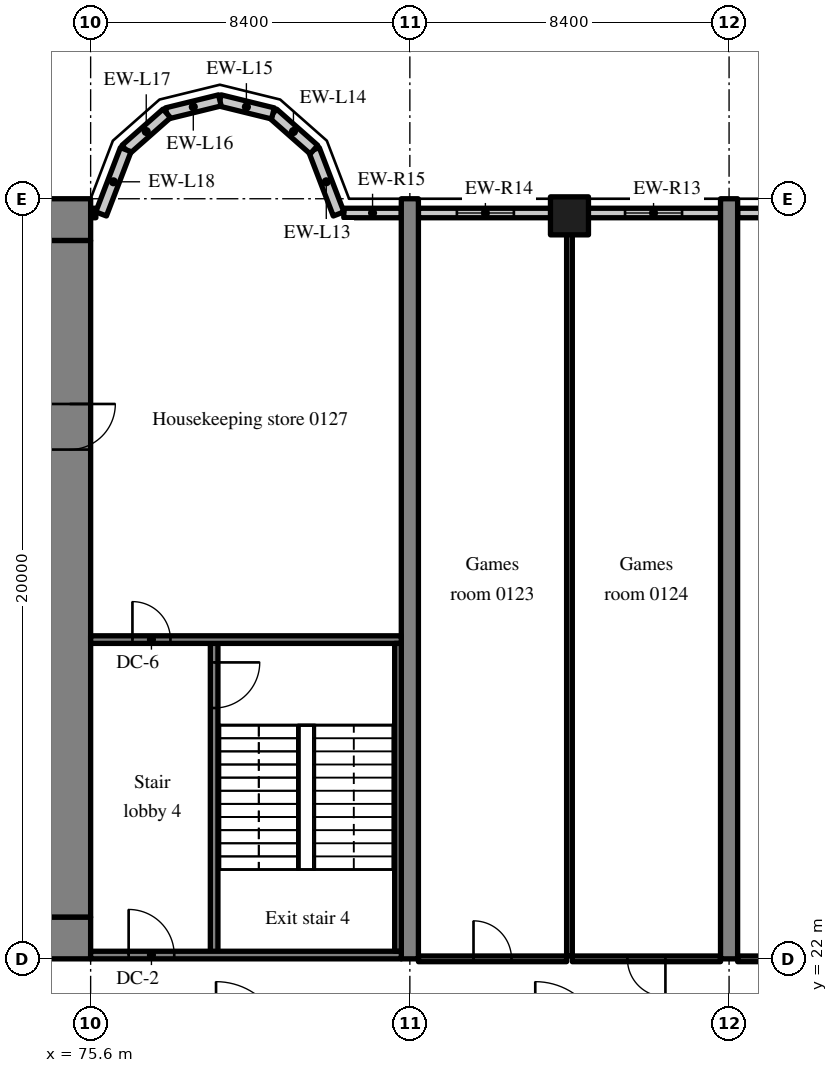
"""IFC4 building model, lengths in metres.
Left out: names, types, materials, properties, quantities, classifications, styles, units other than length and angle.
Written with IfcOpenShell. Run it as: python <this file> out.ifc"""

import sys

from ifc_helpers import new_model, si_unit, direction, frame, frame_2d, origin, origin_2d, place, context, subcontext, project, spatial, rectangle, extrude, source, transform, mapped, element, fill, save


model = new_model("IFC4")
c1 = context("Model", 3, precision=1e-05, world=origin(), true_north=direction((0.0, 1.0)))
c2 = subcontext(c1, "Body", "Model", "MODEL_VIEW")
j1 = project(units=[si_unit("LENGTHUNIT", "METRE"), si_unit("PLANEANGLEUNIT", "RADIAN")], contexts=[c1])
p1 = place(None, origin())
s1 = spatial("IfcSite", under=j1, at=p1, CompositionType="ELEMENT")
p2 = place(p1, origin())
s2 = spatial("IfcBuilding", under=s1, at=p2, CompositionType="ELEMENT")
p3 = place(p2, frame((0.0, 0.0, 6.0)))
s3 = spatial("IfcBuildingStorey", under=s2, at=p3, CompositionType="ELEMENT", Elevation=6.0)
m1 = source(origin(), c2, "Body", "SweptSolid", [
    extrude(rectangle(XDim=50.4, YDim=1.1, at=frame_2d((25.2, 0.0))), origin(), (0.0, 0.0, 1.0), 5.12),
])
p4 = place(p3, frame((25.2, 22.55, 0.0), z_axis=(0.0, 0.0, 1.0), x_axis=(1.0, 0.0, 0.0)))
e1 = element("IfcWall", 1, at=p4, inside=s3, PredefinedType="SHEAR", context=c2, shape_type="MappedRepresentation", body=[
    mapped(m1, transform((0.0, 0.0, 0.0), scale=1.0)),
])
m2 = source(origin(), c2, "Body", "SweptSolid", [
    extrude(rectangle(XDim=1.8, YDim=2.1, at=frame_2d((0.9, 1.05))), frame((0.0, 0.56, 0.0), z_axis=(0.0, -1.0, 0.0), x_axis=(1.0, 0.0, 0.0)), (0.0, 0.0, 1.0), 1.12),
])
p5 = place(p4, frame((15.9, 0.0, 0.0)))
e2 = element("IfcOpeningElement", 2, at=p5, cuts=e1, PredefinedType="OPENING", context=c2, shape_type="MappedRepresentation", body=[
    mapped(m2, transform((0.0, 0.0, 0.0), scale=1.0)),
])
m3 = source(origin(), c2, "Body", "SweptSolid", [
    extrude(rectangle(XDim=1.2, YDim=2.1, at=frame_2d((0.6, 1.05))), frame((0.0, 0.56, 0.0), z_axis=(0.0, -1.0, 0.0), x_axis=(1.0, 0.0, 0.0)), (0.0, 0.0, 1.0), 1.12),
])
p6 = place(p4, frame((27.0, 0.0, 0.0)))
e3 = element("IfcOpeningElement", 3, at=p6, cuts=e1, PredefinedType="OPENING", context=c2, shape_type="MappedRepresentation", body=[
    mapped(m3, transform((0.0, 0.0, 0.0), scale=1.0)),
])
m4 = source(origin(), c2, "Body", "SweptSolid", [
    extrude(rectangle(XDim=0.9, YDim=2.1, at=frame_2d((0.45, 1.05))), frame((0.0, 0.56, 0.0), z_axis=(0.0, -1.0, 0.0), x_axis=(1.0, 0.0, 0.0)), (0.0, 0.0, 1.0), 1.12),
])
p7 = place(p4, frame((34.5, 0.0, 0.0)))
e4 = element("IfcOpeningElement", 4, at=p7, cuts=e1, PredefinedType="OPENING", context=c2, shape_type="MappedRepresentation", body=[
    mapped(m4, transform((0.0, 0.0, 0.0), scale=1.0)),
])
p8 = place(p4, frame((31.5, 0.0, 0.0)))
e5 = element("IfcOpeningElement", 5, at=p8, cuts=e1, PredefinedType="OPENING", context=c2, shape_type="MappedRepresentation", body=[
    mapped(m4, transform((0.0, 0.0, 0.0), scale=1.0)),
])
p9 = place(p4, frame((39.75, 0.0, 0.0)))
e6 = element("IfcOpeningElement", 6, at=p9, cuts=e1, PredefinedType="OPENING", context=c2, shape_type="MappedRepresentation", body=[
    mapped(m4, transform((0.0, 0.0, 0.0), scale=1.0)),
])
p10 = place(p4, frame((36.75, 0.0, 0.0)))
e7 = element("IfcOpeningElement", 7, at=p10, cuts=e1, PredefinedType="OPENING", context=c2, shape_type="MappedRepresentation", body=[
    mapped(m4, transform((0.0, 0.0, 0.0), scale=1.0)),
])
p11 = place(p4, frame((6.425, 0.0, 0.0)))
e8 = element("IfcOpeningElement", 8, at=p11, cuts=e1, PredefinedType="OPENING", context=c2, shape_type="MappedRepresentation", body=[
    mapped(m3, transform((0.0, 0.0, 0.0), scale=1.0)),
])
p12 = place(p4, frame((47.675, 0.0, 0.0)))
e9 = element("IfcOpeningElement", 9, at=p12, cuts=e1, PredefinedType="OPENING", context=c2, shape_type="MappedRepresentation", body=[
    mapped(m3, transform((0.0, 0.0, 0.0), scale=1.0)),
])
p13 = place(p3, frame((25.2, 41.45, 0.0), z_axis=(0.0, 0.0, 1.0), x_axis=(1.0, 0.0, 0.0)))
e10 = element("IfcWall", 10, at=p13, inside=s3, PredefinedType="SHEAR", context=c2, shape_type="MappedRepresentation", body=[
    mapped(m1, transform((0.0, 0.0, 0.0), scale=1.0)),
])
m5 = source(origin(), c2, "Body", "SweptSolid", [
    extrude(rectangle(XDim=17.8, YDim=1.1, at=frame_2d((8.9, 0.0))), origin(), (0.0, 0.0, 1.0), 5.12),
])
p14 = place(p3, frame((75.05, 23.1, 0.0), z_axis=(0.0, 0.0, 1.0), x_axis=(0.0, 1.0, 0.0)))
e11 = element("IfcWall", 11, at=p14, inside=s3, PredefinedType="SHEAR", context=c2, shape_type="MappedRepresentation", body=[
    mapped(m5, transform((0.0, 0.0, 0.0), scale=1.0)),
])
p15 = place(p14, frame((12.3, 0.0, 0.0)))
e12 = element("IfcOpeningElement", 12, at=p15, cuts=e11, PredefinedType="OPENING", context=c2, shape_type="MappedRepresentation", body=[
    mapped(m3, transform((0.0, 0.0, 0.0), scale=1.0)),
])
m6 = source(origin(), c2, "Body", "SweptSolid", [
    extrude(rectangle(XDim=20.0, YDim=0.45, at=frame_2d((10.0, 0.0))), origin(), (0.0, 0.0, 1.0), 5.12),
])
for number, where, z_axis, x_axis in (
    (13, (84.0, 22.0, 0.0), (0.0, 0.0, 1.0), (0.0, 1.0, 0.0)),
    (14, (92.4, 22.0, 0.0), (0.0, 0.0, 1.0), (0.0, 1.0, 0.0)),
):
    element("IfcWall", number, at=place(p3, frame(where, z_axis=z_axis, x_axis=x_axis)), inside=s3, PredefinedType="SHEAR", context=c2, shape_type="MappedRepresentation", body=[
        mapped(m6, transform((0.0, 0.0, 0.0), scale=1.0)),
    ])
m7 = source(origin(), c2, "Body", "SweptSolid", [
    extrude(rectangle(XDim=1.0, YDim=1.0, at=origin_2d()), origin(), (0.0, 0.0, 1.0), 5.12),
])
p16 = place(p3, frame((88.2, 41.55, 0.0), z_axis=(0.0, 0.0, 1.0), x_axis=(1.0, 0.0, 0.0)))
e15 = element("IfcColumn", 15, at=p16, inside=s3, PredefinedType="COLUMN", context=c2, shape_type="MappedRepresentation", body=[
    mapped(m7, transform((0.0, 0.0, 0.0), scale=1.0)),
])
m8 = source(origin(), c2, "Body", "SweptSolid", [
    extrude(rectangle(XDim=15.675, YDim=0.25, at=frame_2d((7.837, 0.0))), origin(), (0.0, 0.0, 1.0), 4.37),
])
p17 = place(p3, frame((108.3, 41.625, 0.0), z_axis=(0.0, 0.0, 1.0), x_axis=(-1.0, 0.0, 0.0)))
e16 = element("IfcWall", 16, at=p17, inside=s3, PredefinedType="SOLIDWALL", context=c2, shape_type="MappedRepresentation", body=[
    mapped(m8, transform((0.0, 0.0, 0.0), scale=1.0)),
])
m9 = source(origin(), c2, "Body", "SweptSolid", [
    extrude(rectangle(XDim=1.5, YDim=1.5, at=frame_2d((0.75, 0.75))), frame((0.0, 0.135, 0.0), z_axis=(0.0, -1.0, 0.0), x_axis=(1.0, 0.0, 0.0)), (0.0, 0.0, 1.0), 0.27),
])
p18 = place(p17, frame((1.209, 0.0, 0.9)))
e17 = element("IfcOpeningElement", 17, at=p18, cuts=e16, PredefinedType="OPENING", context=c2, shape_type="MappedRepresentation", body=[
    mapped(m9, transform((0.0, 0.0, 0.0), scale=1.0)),
])
p19 = place(p17, frame((5.128, 0.0, 0.9)))
e18 = element("IfcOpeningElement", 18, at=p19, cuts=e16, PredefinedType="OPENING", context=c2, shape_type="MappedRepresentation", body=[
    mapped(m9, transform((0.0, 0.0, 0.0), scale=1.0)),
])
p20 = place(p17, frame((9.047, 0.0, 0.9)))
e19 = element("IfcOpeningElement", 19, at=p20, cuts=e16, PredefinedType="OPENING", context=c2, shape_type="MappedRepresentation", body=[
    mapped(m9, transform((0.0, 0.0, 0.0), scale=1.0)),
])
p21 = place(p17, frame((12.966, 0.0, 0.9)))
e20 = element("IfcOpeningElement", 20, at=p21, cuts=e16, PredefinedType="OPENING", context=c2, shape_type="MappedRepresentation", body=[
    mapped(m9, transform((0.0, 0.0, 0.0), scale=1.0)),
])
m10 = source(origin(), c2, "Body", "SweptSolid", [
    extrude(rectangle(XDim=3.525, YDim=0.25, at=frame_2d((1.763, 0.0))), origin(), (0.0, 0.0, 1.0), 4.37),
])
p22 = place(p3, frame((92.175, 41.625, 0.0), z_axis=(0.0, 0.0, 1.0), x_axis=(-1.0, 0.0, 0.0)))
e21 = element("IfcWall", 21, at=p22, inside=s3, PredefinedType="SOLIDWALL", context=c2, shape_type="MappedRepresentation", body=[
    mapped(m10, transform((0.0, 0.0, 0.0), scale=1.0)),
])
p23 = place(p22, frame((1.012, 0.0, 0.9)))
e22 = element("IfcOpeningElement", 22, at=p23, cuts=e21, PredefinedType="OPENING", context=c2, shape_type="MappedRepresentation", body=[
    mapped(m9, transform((0.0, 0.0, 0.0), scale=1.0)),
])
m11 = source(origin(), c2, "Body", "SweptSolid", [
    extrude(rectangle(XDim=3.525, YDim=0.25, at=frame_2d((1.762, 0.0))), origin(), (0.0, 0.0, 1.0), 4.37),
])
p24 = place(p3, frame((87.75, 41.625, 0.0), z_axis=(0.0, 0.0, 1.0), x_axis=(-1.0, 0.0, 0.0)))
e23 = element("IfcWall", 23, at=p24, inside=s3, PredefinedType="SOLIDWALL", context=c2, shape_type="MappedRepresentation", body=[
    mapped(m11, transform((0.0, 0.0, 0.0), scale=1.0)),
])
p25 = place(p24, frame((1.012, 0.0, 0.9)))
e24 = element("IfcOpeningElement", 24, at=p25, cuts=e23, PredefinedType="OPENING", context=c2, shape_type="MappedRepresentation", body=[
    mapped(m9, transform((0.0, 0.0, 0.0), scale=1.0)),
])
m12 = source(origin(), c2, "Body", "SweptSolid", [
    extrude(rectangle(XDim=1.513, YDim=0.25, at=frame_2d((0.756, 0.0))), origin(), (0.0, 0.0, 1.0), 4.37),
])
p26 = place(p3, frame((83.775, 41.625, 0.0), z_axis=(0.0, 0.0, 1.0), x_axis=(-1.0, 0.0, 0.0)))
e25 = element("IfcWall", 25, at=p26, inside=s3, PredefinedType="SOLIDWALL", context=c2, shape_type="MappedRepresentation", body=[
    mapped(m12, transform((0.0, 0.0, 0.0), scale=1.0)),
])
m13 = source(origin(), c2, "Body", "SweptSolid", [
    extrude(rectangle(XDim=1.812, YDim=0.3, at=frame_2d((0.906, 0.0))), origin(), (0.0, 0.0, 1.0), 5.12),
])
p27 = place(p3, frame((82.125, 41.6, 0.0), z_axis=(0.0, 0.0, 1.0), x_axis=(-0.357877270961, 0.93376863244, 0.0)))
e26 = element("IfcWall", 26, at=p27, inside=s3, PredefinedType="SOLIDWALL", context=c2, shape_type="MappedRepresentation", body=[
    mapped(m13, transform((0.0, 0.0, 0.0), scale=1.0)),
])
m14 = source(origin(), c2, "Body", "SweptSolid", [
    extrude(rectangle(XDim=1.44, YDim=0.3, at=frame_2d((0.72, 0.0))), origin(), (0.0, 0.0, 1.0), 5.12),
])
p28 = place(p3, frame((81.477, 43.292, 0.0), z_axis=(0.0, 0.0, 1.0), x_axis=(-0.74957555648, 0.661918790432, 0.0)))
e27 = element("IfcWall", 27, at=p28, inside=s3, PredefinedType="SOLIDWALL", context=c2, shape_type="MappedRepresentation", body=[
    mapped(m14, transform((0.0, 0.0, 0.0), scale=1.0)),
])
m15 = source(origin(), c2, "Body", "SweptSolid", [
    extrude(rectangle(XDim=1.439, YDim=0.3, at=frame_2d((0.719, 0.0))), origin(), (0.0, 0.0, 1.0), 5.12),
])
for number, where, z_axis, x_axis in (
    (28, (80.397, 44.245, 0.0), (0.0, 0.0, 1.0), (-0.971, 0.238, 0.0)),
    (29, (79.0, 44.588, 0.0), (0.0, 0.0, 1.0), (-0.971, -0.238, 0.0)),
):
    element("IfcWall", number, at=place(p3, frame(where, z_axis=z_axis, x_axis=x_axis)), inside=s3, PredefinedType="SOLIDWALL", context=c2, shape_type="MappedRepresentation", body=[
        mapped(m15, transform((0.0, 0.0, 0.0), scale=1.0)),
    ])
p29 = place(p3, frame((77.603, 44.245, 0.0), z_axis=(0.0, 0.0, 1.0), x_axis=(-0.74957555648, -0.661918790432, 0.0)))
e30 = element("IfcWall", 30, at=p29, inside=s3, PredefinedType="SOLIDWALL", context=c2, shape_type="MappedRepresentation", body=[
    mapped(m14, transform((0.0, 0.0, 0.0), scale=1.0)),
])
p30 = place(p3, frame((76.523, 43.292, 0.0), z_axis=(0.0, 0.0, 1.0), x_axis=(-0.357877270961, -0.93376863244, 0.0)))
e31 = element("IfcWall", 31, at=p30, inside=s3, PredefinedType="SOLIDWALL", context=c2, shape_type="MappedRepresentation", body=[
    mapped(m13, transform((0.0, 0.0, 0.0), scale=1.0)),
])
m16 = source(origin(), c2, "Body", "SweptSolid", [
    extrude(rectangle(XDim=0.138, YDim=0.25, at=frame_2d((0.069, 0.0))), origin(), (0.0, 0.0, 1.0), 4.37),
])
p31 = place(p3, frame((75.738, 41.625, 0.0), z_axis=(0.0, 0.0, 1.0), x_axis=(-1.0, 0.0, 0.0)))
e32 = element("IfcWall", 32, at=p31, inside=s3, PredefinedType="SOLIDWALL", context=c2, shape_type="MappedRepresentation", body=[
    mapped(m16, transform((0.0, 0.0, 0.0), scale=1.0)),
])
m17 = source(origin(), c2, "Body", "SweptSolid", [
    extrude(rectangle(XDim=8.3, YDim=0.2, at=frame_2d((4.15, 0.0))), origin(), (0.0, 0.0, 1.0), 5.12),
])
p32 = place(p3, frame((78.85, 22.1, 0.0), z_axis=(0.0, 0.0, 1.0), x_axis=(0.0, 1.0, 0.0)))
e33 = element("IfcWall", 33, at=p32, inside=s3, PredefinedType="SOLIDWALL", context=c2, shape_type="MappedRepresentation", body=[
    mapped(m17, transform((0.0, 0.0, 0.0), scale=1.0)),
])
m18 = source(origin(), c2, "Body", "SweptSolid", [
    extrude(rectangle(XDim=1.2, YDim=2.1, at=frame_2d((0.6, 1.05))), frame((0.0, 0.11, 0.0), z_axis=(0.0, -1.0, 0.0), x_axis=(1.0, 0.0, 0.0)), (0.0, 0.0, 1.0), 0.22),
])
p33 = place(p32, frame((6.5, 0.0, 0.0)))
e34 = element("IfcOpeningElement", 34, at=p33, cuts=e33, PredefinedType="OPENING", context=c2, shape_type="MappedRepresentation", body=[
    mapped(m18, transform((0.0, 0.0, 0.0), scale=1.0)),
])
m19 = source(origin(), c2, "Body", "SweptSolid", [
    extrude(rectangle(XDim=8.175, YDim=0.2, at=frame_2d((4.087, 0.0))), origin(), (0.0, 0.0, 1.0), 5.12),
])
p34 = place(p3, frame((83.775, 22.1, 0.0), z_axis=(0.0, 0.0, 1.0), x_axis=(-1.0, 0.0, 0.0)))
e35 = element("IfcWall", 35, at=p34, inside=s3, PredefinedType="SOLIDWALL", context=c2, shape_type="MappedRepresentation", body=[
    mapped(m19, transform((0.0, 0.0, 0.0), scale=1.0)),
])
p35 = place(p34, frame((5.975, 0.0, 0.0)))
e36 = element("IfcOpeningElement", 36, at=p35, cuts=e35, PredefinedType="OPENING", context=c2, shape_type="MappedRepresentation", body=[
    mapped(m18, transform((0.0, 0.0, 0.0), scale=1.0)),
])
p36 = place(p3, frame((83.775, 30.4, 0.0), z_axis=(0.0, 0.0, 1.0), x_axis=(-1.0, 0.0, 0.0)))
e37 = element("IfcWall", 37, at=p36, inside=s3, PredefinedType="SOLIDWALL", context=c2, shape_type="MappedRepresentation", body=[
    mapped(m19, transform((0.0, 0.0, 0.0), scale=1.0)),
])
m20 = source(origin(), c2, "Body", "SweptSolid", [
    extrude(rectangle(XDim=1.0, YDim=2.1, at=frame_2d((0.5, 1.05))), frame((0.0, 0.11, 0.0), z_axis=(0.0, -1.0, 0.0), x_axis=(1.0, 0.0, 0.0)), (0.0, 0.0, 1.0), 0.22),
])
p37 = place(p36, frame((6.075, 0.0, 0.0)))
e38 = element("IfcOpeningElement", 38, at=p37, cuts=e37, PredefinedType="OPENING", context=c2, shape_type="MappedRepresentation", body=[
    mapped(m20, transform((0.0, 0.0, 0.0), scale=1.0)),
])
m21 = source(origin(), c2, "Body", "SweptSolid", [
    extrude(rectangle(XDim=8.1, YDim=0.175, at=frame_2d((4.05, 0.0))), origin(), (0.0, 0.0, 1.0), 5.12),
])
p38 = place(p3, frame((83.688, 22.2, 0.0), z_axis=(0.0, 0.0, 1.0), x_axis=(0.0, 1.0, 0.0)))
e39 = element("IfcWall", 39, at=p38, inside=s3, PredefinedType="SOLIDWALL", context=c2, shape_type="MappedRepresentation", body=[
    mapped(m21, transform((0.0, 0.0, 0.0), scale=1.0)),
])
m22 = source(origin(), c2, "Body", "SweptSolid", [
    extrude(rectangle(XDim=3.9, YDim=0.15, at=frame_2d((1.95, 0.0))), origin(), (0.0, 0.0, 1.0), 4.42),
])
p39 = place(p3, frame((84.225, 22.0, 0.0), z_axis=(0.0, 0.0, 1.0), x_axis=(1.0, 0.0, 0.0)))
e40 = element("IfcWall", 40, at=p39, inside=s3, PredefinedType="PARTITIONING", context=c2, shape_type="MappedRepresentation", body=[
    mapped(m22, transform((0.0, 0.0, 0.0), scale=1.0)),
])
m23 = source(origin(), c2, "Body", "SweptSolid", [
    extrude(rectangle(XDim=1.0, YDim=2.1, at=frame_2d((0.5, 1.05))), frame((0.0, 0.085, 0.0), z_axis=(0.0, -1.0, 0.0), x_axis=(1.0, 0.0, 0.0)), (0.0, 0.0, 1.0), 0.17),
])
p40 = place(p39, frame((1.45, 0.0, 0.0)))
e41 = element("IfcOpeningElement", 41, at=p40, cuts=e40, PredefinedType="OPENING", context=c2, shape_type="MappedRepresentation", body=[
    mapped(m23, transform((0.0, 0.0, 0.0), scale=1.0)),
])
m24 = source(origin(), c2, "Body", "SweptSolid", [
    extrude(rectangle(XDim=3.9, YDim=0.15, at=frame_2d((1.95, 0.0))), origin(), (0.0, 0.0, 1.0), 4.42),
])
p41 = place(p3, frame((88.275, 22.0, 0.0), z_axis=(0.0, 0.0, 1.0), x_axis=(1.0, 0.0, 0.0)))
e42 = element("IfcWall", 42, at=p41, inside=s3, PredefinedType="PARTITIONING", context=c2, shape_type="MappedRepresentation", body=[
    mapped(m24, transform((0.0, 0.0, 0.0), scale=1.0)),
])
p42 = place(p41, frame((1.45, 0.0, 0.0)))
e43 = element("IfcOpeningElement", 43, at=p42, cuts=e42, PredefinedType="OPENING", context=c2, shape_type="MappedRepresentation", body=[
    mapped(m23, transform((0.0, 0.0, 0.0), scale=1.0)),
])
m25 = source(origin(), c2, "Body", "SweptSolid", [
    extrude(rectangle(XDim=19.025, YDim=0.15, at=frame_2d((9.513, 0.0))), origin(), (0.0, 0.0, 1.0), 5.12),
])
p43 = place(p3, frame((88.2, 22.075, 0.0), z_axis=(0.0, 0.0, 1.0), x_axis=(0.0, 1.0, 0.0)))
e44 = element("IfcWall", 44, at=p43, inside=s3, PredefinedType="PARTITIONING", context=c2, shape_type="MappedRepresentation", body=[
    mapped(m25, transform((0.0, 0.0, 0.0), scale=1.0)),
])
m26 = source(origin(), c2, "Body", "SweptSolid", [
    extrude(rectangle(XDim=7.725, YDim=0.15, at=frame_2d((3.863, 0.0))), origin(), (0.0, 0.0, 1.0), 4.42),
])
p44 = place(p3, frame((92.625, 22.0, 0.0), z_axis=(0.0, 0.0, 1.0), x_axis=(1.0, 0.0, 0.0)))
e45 = element("IfcWall", 45, at=p44, inside=s3, PredefinedType="PARTITIONING", context=c2, shape_type="MappedRepresentation", body=[
    mapped(m26, transform((0.0, 0.0, 0.0), scale=1.0)),
])
m27 = source(origin(), c2, "Body", "SweptSolid", [
    extrude(rectangle(XDim=1.8, YDim=2.1, at=frame_2d((0.9, 1.05))), frame((0.0, 0.085, 0.0), z_axis=(0.0, -1.0, 0.0), x_axis=(1.0, 0.0, 0.0)), (0.0, 0.0, 1.0), 0.17),
])
p45 = place(p44, frame((2.962, 0.0, 0.0)))
e46 = element("IfcOpeningElement", 46, at=p45, cuts=e45, PredefinedType="OPENING", context=c2, shape_type="MappedRepresentation", body=[
    mapped(m27, transform((0.0, 0.0, 0.0), scale=1.0)),
])
m28 = source(origin(), c2, "Body", "SweptSolid", [
    extrude(rectangle(XDim=1.5, YDim=1.5, at=frame_2d((0.75, 0.75))), frame((0.0, 0.03, 0.0), z_axis=(0.0, -1.0, 0.0), x_axis=(1.0, 0.0, 0.0)), (0.0, 0.0, 1.0), 0.06),
])
p46 = place(p23, origin())
e47 = element("IfcWindow", 47, at=p46, inside=s3, PartitioningType="SINGLE_PANEL", PredefinedType="WINDOW", context=c2, shape_type="MappedRepresentation", body=[
    mapped(m28, transform((0.0, 0.0, 0.0), scale=1.0)),
])
fill(e22, e47)
p47 = place(p25, origin())
e48 = element("IfcWindow", 48, at=p47, inside=s3, PartitioningType="SINGLE_PANEL", PredefinedType="WINDOW", context=c2, shape_type="MappedRepresentation", body=[
    mapped(m28, transform((0.0, 0.0, 0.0), scale=1.0)),
])
fill(e24, e48)
m29 = source(origin(), c2, "Body", "SweptSolid", [
    extrude(rectangle(XDim=1.2, YDim=2.1, at=frame_2d((0.6, 1.05))), frame((0.0, 0.025, 0.0), z_axis=(0.0, -1.0, 0.0), x_axis=(1.0, 0.0, 0.0)), (0.0, 0.0, 1.0), 0.05),
])
p48 = place(p15, origin())
e49 = element("IfcDoor", 49, at=p48, inside=s3, OperationType="SINGLE_SWING_RIGHT", PredefinedType="DOOR", context=c2, shape_type="MappedRepresentation", body=[
    mapped(m29, transform((0.0, 0.0, 0.0), scale=1.0)),
])
fill(e12, e49)
p49 = place(p33, origin())
e50 = element("IfcDoor", 50, at=p49, inside=s3, OperationType="SINGLE_SWING_RIGHT", PredefinedType="DOOR", context=c2, shape_type="MappedRepresentation", body=[
    mapped(m29, transform((0.0, 0.0, 0.0), scale=1.0)),
])
fill(e34, e50)
p50 = place(p35, origin())
e51 = element("IfcDoor", 51, at=p50, inside=s3, OperationType="SINGLE_SWING_RIGHT", PredefinedType="DOOR", context=c2, shape_type="MappedRepresentation", body=[
    mapped(m29, transform((0.0, 0.0, 0.0), scale=1.0)),
])
fill(e36, e51)
m30 = source(origin(), c2, "Body", "SweptSolid", [
    extrude(rectangle(XDim=1.0, YDim=2.1, at=frame_2d((0.5, 1.05))), frame((0.0, 0.025, 0.0), z_axis=(0.0, -1.0, 0.0), x_axis=(1.0, 0.0, 0.0)), (0.0, 0.0, 1.0), 0.05),
])
p51 = place(p37, origin())
e52 = element("IfcDoor", 52, at=p51, inside=s3, OperationType="SINGLE_SWING_RIGHT", PredefinedType="DOOR", context=c2, shape_type="MappedRepresentation", body=[
    mapped(m30, transform((0.0, 0.0, 0.0), scale=1.0)),
])
fill(e38, e52)
p52 = place(p40, origin())
e53 = element("IfcDoor", 53, at=p52, inside=s3, OperationType="SINGLE_SWING_LEFT", PredefinedType="DOOR", context=c2, shape_type="MappedRepresentation", body=[
    mapped(m30, transform((0.0, 0.0, 0.0), scale=1.0)),
])
fill(e41, e53)
p53 = place(p42, origin())
e54 = element("IfcDoor", 54, at=p53, inside=s3, OperationType="SINGLE_SWING_RIGHT", PredefinedType="DOOR", context=c2, shape_type="MappedRepresentation", body=[
    mapped(m30, transform((0.0, 0.0, 0.0), scale=1.0)),
])
fill(e43, e54)
save(model, sys.argv[1])
